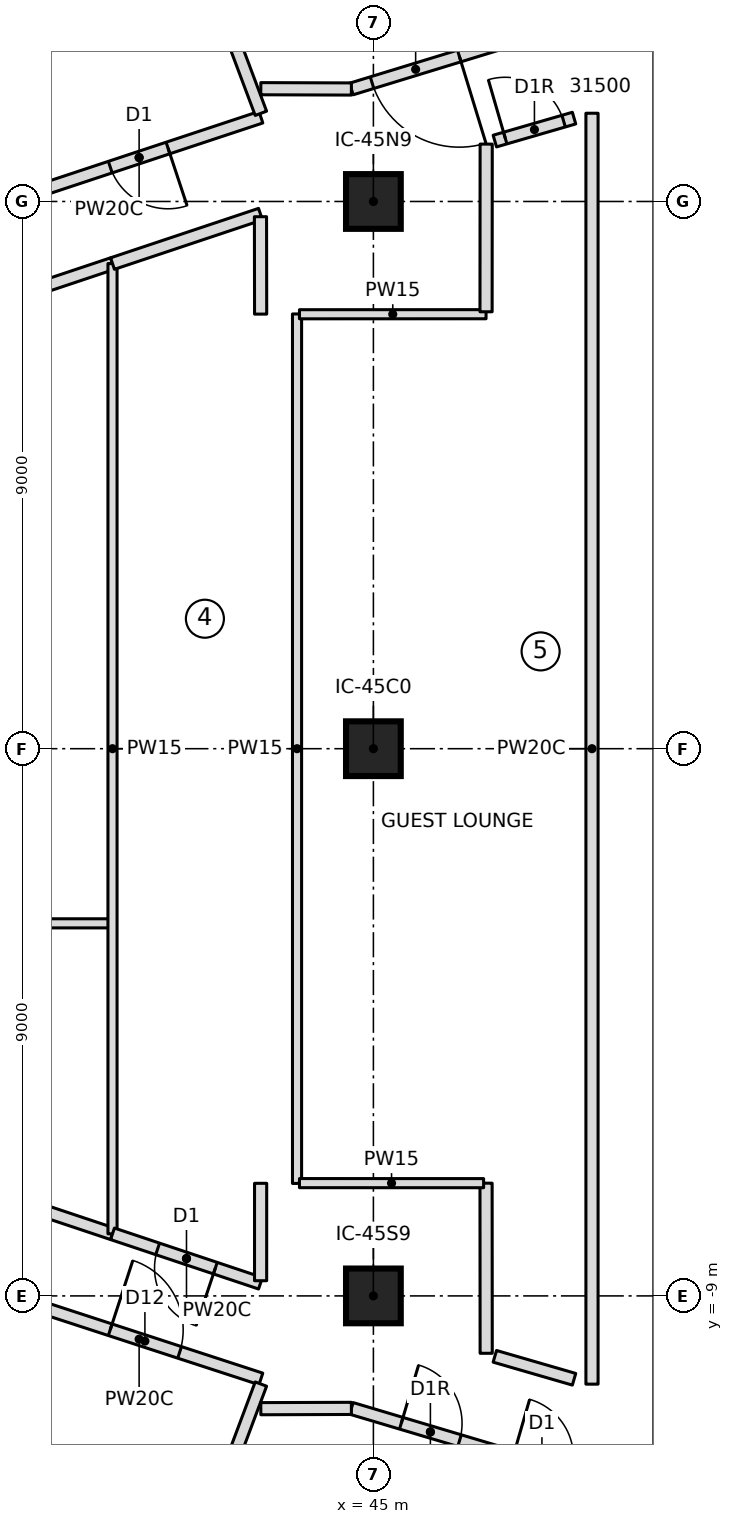
"""IFC4 building model, lengths in metres.
Left out: names, types, materials, properties, quantities, classifications, styles, units other than length and angle.
Written with IfcOpenShell. Run it as: python <this file> out.ifc"""

import sys

from ifc_helpers import new_model, si_unit, direction, frame, frame_2d, origin, origin_2d, place, context, subcontext, project, spatial, rectangle, extrude, element, fill, save


model = new_model("IFC4")
c1 = context("Model", 3, precision=1e-05, world=origin(), true_north=direction((0.0, 1.0)))
c2 = subcontext(c1, "Body", "Model", "MODEL_VIEW")
j1 = project(units=[si_unit("LENGTHUNIT", "METRE"), si_unit("PLANEANGLEUNIT", "RADIAN")], contexts=[c1])
p1 = place(None, origin())
s1 = spatial("IfcSite", under=j1, at=p1, CompositionType="ELEMENT")
p2 = place(p1, origin())
s2 = spatial("IfcBuilding", under=s1, at=p2, CompositionType="ELEMENT")
p3 = place(p2, frame((0.0, 0.0, 216.2)))
s3 = spatial("IfcBuildingStorey", under=s2, at=p3, CompositionType="ELEMENT", Elevation=216.2)
for number, where, z_axis, x_axis in (
    (1, (45.0, -9.0, 0.0), (0.0, 0.0, 1.0), (1.0, 0.0, 0.0)),
    (2, (45.0, 0.0, 0.0), (0.0, 0.0, 1.0), (1.0, 0.0, 0.0)),
    (3, (45.0, 9.0, 0.0), (0.0, 0.0, 1.0), (1.0, 0.0, 0.0)),
):
    element("IfcColumn", number, at=place(p3, frame(where, z_axis=z_axis, x_axis=x_axis)), inside=s3, PredefinedType="COLUMN", context=c2, shape_type="SweptSolid", body=[
        extrude(rectangle(XDim=0.9, YDim=0.9, at=origin_2d()), origin(), (0.0, 0.0, 1.0), 4.6),
    ])
p4 = place(p3, frame((43.15, 10.386, 0.0), z_axis=(0.0, 0.0, 1.0), x_axis=(-0.949231523576, -0.314578312427, 0.0)))
e4 = element("IfcWall", 4, at=p4, inside=s3, PredefinedType="PARTITIONING", context=c2, shape_type="SweptSolid", body=[
    extrude(rectangle(XDim=4.219, YDim=0.2, at=frame_2d((2.11, 0.0))), origin(), (0.0, 0.0, 1.0), 4.3),
])
p5 = place(p4, frame((1.61, 0.0, 0.0)))
e5 = element("IfcOpeningElement", 5, at=p5, cuts=e4, PredefinedType="OPENING", context=c2, shape_type="SweptSolid", body=[
    extrude(rectangle(XDim=1.0, YDim=2.1, at=frame_2d((0.5, 1.05))), frame((0.0, 0.11, 0.0), z_axis=(0.0, -1.0, 0.0), x_axis=(1.0, 0.0, 0.0)), (0.0, 0.0, 1.0), 0.22),
])
p6 = place(p3, frame((43.15, 10.45, 0.0), z_axis=(0.0, 0.0, 1.0), x_axis=(-0.351119888923, 0.936330509811, 0.0)))
e6 = element("IfcWall", 6, at=p6, inside=s3, PredefinedType="PARTITIONING", context=c2, shape_type="SweptSolid", body=[
    extrude(rectangle(XDim=7.531, YDim=0.2, at=frame_2d((3.766, 0.0))), origin(), (0.0, 0.0, 1.0), 4.3),
])
p7 = place(p3, frame((47.23, 11.643, 0.0), z_axis=(0.0, 0.0, 1.0), x_axis=(-0.956220019134, -0.292648722887, 0.0)))
e7 = element("IfcWall", 7, at=p7, inside=s3, PredefinedType="PARTITIONING", context=c2, shape_type="SweptSolid", body=[
    extrude(rectangle(XDim=2.71, YDim=0.2, at=frame_2d((1.355, 0.0))), origin(), (0.0, 0.0, 1.0), 4.3),
])
p8 = place(p7, frame((0.855, 0.0, 0.0)))
e8 = element("IfcOpeningElement", 8, at=p8, cuts=e7, PredefinedType="OPENING", context=c2, shape_type="SweptSolid", body=[
    extrude(rectangle(XDim=1.5, YDim=2.1, at=frame_2d((0.75, 1.05))), frame((0.0, 0.11, 0.0), z_axis=(0.0, -1.0, 0.0), x_axis=(1.0, 0.0, 0.0)), (0.0, 0.0, 1.0), 0.22),
])
p9 = place(p3, frame((39.145, -9.059, 0.0), z_axis=(0.0, 0.0, 1.0), x_axis=(0.950709044073, -0.310084365161, 0.0)))
e9 = element("IfcWall", 9, at=p9, inside=s3, PredefinedType="PARTITIONING", context=c2, shape_type="SweptSolid", body=[
    extrude(rectangle(XDim=4.213, YDim=0.2, at=frame_2d((2.106, 0.0))), origin(), (0.0, 0.0, 1.0), 4.3),
])
p10 = place(p9, frame((1.607, 0.0, 0.0)))
e10 = element("IfcOpeningElement", 10, at=p10, cuts=e9, PredefinedType="OPENING", context=c2, shape_type="SweptSolid", body=[
    extrude(rectangle(XDim=1.2, YDim=2.1, at=frame_2d((0.6, 1.05))), frame((0.0, 0.11, 0.0), z_axis=(0.0, -1.0, 0.0), x_axis=(1.0, 0.0, 0.0)), (0.0, 0.0, 1.0), 0.22),
])
p11 = place(p3, frame((40.506, -17.501, 0.0), z_axis=(0.0, 0.0, 1.0), x_axis=(0.351119888923, 0.936330509811, 0.0)))
e11 = element("IfcWall", 11, at=p11, inside=s3, PredefinedType="PARTITIONING", context=c2, shape_type="SweptSolid", body=[
    extrude(rectangle(XDim=7.531, YDim=0.2, at=frame_2d((3.766, 0.0))), origin(), (0.0, 0.0, 1.0), 4.3),
])
p12 = place(p3, frame((44.638, -10.85, 0.0), z_axis=(0.0, 0.0, 1.0), x_axis=(0.95835737874, -0.285571592801, 0.0)))
e12 = element("IfcWall", 12, at=p12, inside=s3, PredefinedType="PARTITIONING", context=c2, shape_type="SweptSolid", body=[
    extrude(rectangle(XDim=2.712, YDim=0.2, at=frame_2d((1.356, 0.0))), origin(), (0.0, 0.0, 1.0), 4.3),
])
p13 = place(p12, frame((0.856, 0.0, 0.0)))
e13 = element("IfcOpeningElement", 13, at=p13, cuts=e12, PredefinedType="OPENING", context=c2, shape_type="SweptSolid", body=[
    extrude(rectangle(XDim=1.0, YDim=2.1, at=frame_2d((0.5, 1.05))), frame((0.0, 0.11, 0.0), z_axis=(0.0, -1.0, 0.0), x_axis=(1.0, 0.0, 0.0)), (0.0, 0.0, 1.0), 0.22),
])
p14 = place(p3, frame((35.247, -2.872, 0.0), z_axis=(0.0, 0.0, 1.0), x_axis=(1.0, 0.0, 0.0)))
e14 = element("IfcWall", 14, at=p14, inside=s3, PredefinedType="PARTITIONING", context=c2, shape_type="SweptSolid", body=[
    extrude(rectangle(XDim=5.463, YDim=0.15, at=frame_2d((2.731, 0.0))), origin(), (0.0, 0.0, 1.0), 4.3),
])
for number, where, z_axis, x_axis in (
    (15, (40.709, -7.979, 0.0), (0.0, 0.0, 1.0), (-0.948, 0.317, 0.0)),
    (16, (39.314, 7.512, 0.0), (0.0, 0.0, 1.0), (0.948, 0.317, 0.0)),
):
    element("IfcWall", number, at=place(p3, frame(where, z_axis=z_axis, x_axis=x_axis)), inside=s3, PredefinedType="PARTITIONING", context=c2, shape_type="SweptSolid", body=[
        extrude(rectangle(XDim=1.472, YDim=0.2, at=frame_2d((0.736, 0.0))), origin(), (0.0, 0.0, 1.0), 4.3),
    ])
p15 = place(p3, frame((40.709, -7.979, 0.0), z_axis=(0.0, 0.0, 1.0), x_axis=(0.0, 1.0, 0.0)))
e17 = element("IfcWall", 17, at=p15, inside=s3, PredefinedType="PARTITIONING", context=c2, shape_type="SweptSolid", body=[
    extrude(rectangle(XDim=15.958, YDim=0.15, at=frame_2d((7.979, 0.0))), origin(), (0.0, 0.0, 1.0), 4.3),
])
p16 = place(p3, frame((43.143, -8.792, 0.0), z_axis=(0.0, 0.0, 1.0), x_axis=(-0.948473756095, 0.316855699016, 0.0)))
e18 = element("IfcWall", 18, at=p16, inside=s3, PredefinedType="PARTITIONING", context=c2, shape_type="SweptSolid", body=[
    extrude(rectangle(XDim=2.566, YDim=0.2, at=frame_2d((1.283, 0.0))), origin(), (0.0, 0.0, 1.0), 4.3),
])
p17 = place(p16, frame((0.783, 0.0, 0.0)))
e19 = element("IfcOpeningElement", 19, at=p17, cuts=e18, PredefinedType="OPENING", context=c2, shape_type="SweptSolid", body=[
    extrude(rectangle(XDim=1.0, YDim=2.1, at=frame_2d((0.5, 1.05))), frame((0.0, 0.11, 0.0), z_axis=(0.0, -1.0, 0.0), x_axis=(1.0, 0.0, 0.0)), (0.0, 0.0, 1.0), 0.22),
])
p18 = place(p3, frame((40.709, 7.979, 0.0), z_axis=(0.0, 0.0, 1.0), x_axis=(0.948473756095, 0.316855699016, 0.0)))
e20 = element("IfcWall", 20, at=p18, inside=s3, PredefinedType="PARTITIONING", context=c2, shape_type="SweptSolid", body=[
    extrude(rectangle(XDim=2.566, YDim=0.2, at=frame_2d((1.283, 0.0))), origin(), (0.0, 0.0, 1.0), 4.3),
])
p19 = place(p3, frame((43.744, -7.15, 0.0), z_axis=(0.0, 0.0, 1.0), x_axis=(0.0, 1.0, 0.0)))
e21 = element("IfcWall", 21, at=p19, inside=s3, PredefinedType="PARTITIONING", context=c2, shape_type="SweptSolid", body=[
    extrude(rectangle(XDim=14.3, YDim=0.15, at=frame_2d((7.15, 0.0))), origin(), (0.0, 0.0, 1.0), 4.3),
])
p20 = place(p3, frame((46.997, 9.993, 0.0), z_axis=(0.0, 0.0, 1.0), x_axis=(0.960450321583, 0.278451395706, 0.0)))
e22 = element("IfcWall", 22, at=p20, inside=s3, PredefinedType="PARTITIONING", context=c2, shape_type="SweptSolid", body=[
    extrude(rectangle(XDim=1.356, YDim=0.2, at=frame_2d((0.678, 0.0))), origin(), (0.0, 0.0, 1.0), 4.3),
])
p21 = place(p20, frame((0.178, 0.0, 0.0)))
e23 = element("IfcOpeningElement", 23, at=p21, cuts=e22, PredefinedType="OPENING", context=c2, shape_type="SweptSolid", body=[
    extrude(rectangle(XDim=1.0, YDim=2.1, at=frame_2d((0.5, 1.05))), frame((0.0, 0.11, 0.0), z_axis=(0.0, -1.0, 0.0), x_axis=(1.0, 0.0, 0.0)), (0.0, 0.0, 1.0), 0.22),
])
p22 = place(p3, frame((48.3, -10.371, 0.0), z_axis=(0.0, 0.0, 1.0), x_axis=(-0.960450321583, 0.278451395706, 0.0)))
e24 = element("IfcWall", 24, at=p22, inside=s3, PredefinedType="PARTITIONING", context=c2, shape_type="SweptSolid", body=[
    extrude(rectangle(XDim=1.356, YDim=0.2, at=frame_2d((0.678, 0.0))), origin(), (0.0, 0.0, 1.0), 4.3),
])
p23 = place(p3, frame((43.143, 8.75, 0.0), z_axis=(0.0, 0.0, 1.0), x_axis=(0.001524156132, -0.999998838473, 0.0)))
e25 = element("IfcWall", 25, at=p23, inside=s3, PredefinedType="PARTITIONING", context=c2, shape_type="SweptSolid", body=[
    extrude(rectangle(XDim=1.602, YDim=0.2, at=frame_2d((0.801, 0.0))), origin(), (0.0, 0.0, 1.0), 4.3),
])
p24 = place(p3, frame((43.146, -7.148, 0.0), z_axis=(0.0, 0.0, 1.0), x_axis=(-0.000304785112, -0.999999953553, 0.0)))
e26 = element("IfcWall", 26, at=p24, inside=s3, PredefinedType="PARTITIONING", context=c2, shape_type="SweptSolid", body=[
    extrude(rectangle(XDim=1.602, YDim=0.2, at=frame_2d((0.801, 0.0))), origin(), (0.0, 0.0, 1.0), 4.3),
])
p25 = place(p3, frame((43.784, 7.145, 0.0), z_axis=(0.0, 0.0, 1.0), x_axis=(0.999999971515, 0.000238682466, 0.0)))
e27 = element("IfcWall", 27, at=p25, inside=s3, PredefinedType="PARTITIONING", context=c2, shape_type="SweptSolid", body=[
    extrude(rectangle(XDim=3.069, YDim=0.15, at=frame_2d((1.534, 0.0))), origin(), (0.0, 0.0, 1.0), 4.3),
])
p26 = place(p3, frame((46.853, 7.186, 0.0), z_axis=(0.0, 0.0, 1.0), x_axis=(0.00079667143, 0.999999682657, 0.0)))
e28 = element("IfcWall", 28, at=p26, inside=s3, PredefinedType="PARTITIONING", context=c2, shape_type="SweptSolid", body=[
    extrude(rectangle(XDim=2.758, YDim=0.2, at=frame_2d((1.379, 0.0))), origin(), (0.0, 0.0, 1.0), 4.3),
])
p27 = place(p3, frame((48.595, 10.451, 0.0), z_axis=(0.0, 0.0, 1.0), x_axis=(0.0, -1.0, 0.0)))
e29 = element("IfcWall", 29, at=p27, inside=s3, PredefinedType="PARTITIONING", context=c2, shape_type="SweptSolid", body=[
    extrude(rectangle(XDim=20.903, YDim=0.2, at=frame_2d((10.451, 0.0))), origin(), (0.0, 0.0, 1.0), 4.3),
])
p28 = place(p3, frame((46.855, -9.944, 0.0), z_axis=(0.0, 0.0, 1.0), x_axis=(-0.000785271549, 0.999999691674, 0.0)))
e30 = element("IfcWall", 30, at=p28, inside=s3, PredefinedType="PARTITIONING", context=c2, shape_type="SweptSolid", body=[
    extrude(rectangle(XDim=2.798, YDim=0.2, at=frame_2d((1.399, 0.0))), origin(), (0.0, 0.0, 1.0), 4.3),
])
p29 = place(p3, frame((46.813, -7.146, 0.0), z_axis=(0.0, 0.0, 1.0), x_axis=(-0.999999970757, 0.000241837961, 0.0)))
e31 = element("IfcWall", 31, at=p29, inside=s3, PredefinedType="PARTITIONING", context=c2, shape_type="SweptSolid", body=[
    extrude(rectangle(XDim=3.029, YDim=0.15, at=frame_2d((1.514, 0.0))), origin(), (0.0, 0.0, 1.0), 4.3),
])
for number, where, z_axis, x_axis in (
    (32, (44.638, 10.85, 0.0), (0.0, 0.0, 1.0), (-1.0, 0.003, 0.0)),
    (33, (43.148, -10.855, 0.0), (0.0, 0.0, 1.0), (1.0, 0.003, 0.0)),
):
    element("IfcWall", number, at=place(p3, frame(where, z_axis=z_axis, x_axis=x_axis)), inside=s3, PredefinedType="PARTITIONING", context=c2, shape_type="SweptSolid", body=[
        extrude(rectangle(XDim=1.49, YDim=0.2, at=frame_2d((0.745, 0.0))), origin(), (0.0, 0.0, 1.0), 4.3),
    ])
p30 = place(p5, origin())
e34 = element("IfcDoor", 34, at=p30, inside=s3, OperationType="SINGLE_SWING_LEFT", PredefinedType="DOOR", context=c2, shape_type="SweptSolid", body=[
    extrude(rectangle(XDim=1.0, YDim=2.1, at=frame_2d((0.5, 1.05))), frame((0.0, 0.025, 0.0), z_axis=(0.0, -1.0, 0.0), x_axis=(1.0, 0.0, 0.0)), (0.0, 0.0, 1.0), 0.05),
])
fill(e5, e34)
p31 = place(p8, origin())
e35 = element("IfcDoor", 35, at=p31, inside=s3, OperationType="DOUBLE_DOOR_SINGLE_SWING", PredefinedType="DOOR", context=c2, shape_type="SweptSolid", body=[
    extrude(rectangle(XDim=1.5, YDim=2.1, at=frame_2d((0.75, 1.05))), frame((0.0, 0.025, 0.0), z_axis=(0.0, -1.0, 0.0), x_axis=(1.0, 0.0, 0.0)), (0.0, 0.0, 1.0), 0.05),
])
fill(e8, e35)
p32 = place(p10, origin())
e36 = element("IfcDoor", 36, at=p32, inside=s3, OperationType="SINGLE_SWING_RIGHT", PredefinedType="DOOR", context=c2, shape_type="SweptSolid", body=[
    extrude(rectangle(XDim=1.2, YDim=2.1, at=frame_2d((0.6, 1.05))), frame((0.0, 0.025, 0.0), z_axis=(0.0, -1.0, 0.0), x_axis=(1.0, 0.0, 0.0)), (0.0, 0.0, 1.0), 0.05),
])
fill(e10, e36)
p33 = place(p13, origin())
e37 = element("IfcDoor", 37, at=p33, inside=s3, OperationType="SINGLE_SWING_RIGHT", PredefinedType="DOOR", context=c2, shape_type="SweptSolid", body=[
    extrude(rectangle(XDim=1.0, YDim=2.1, at=frame_2d((0.5, 1.05))), frame((0.0, 0.025, 0.0), z_axis=(0.0, -1.0, 0.0), x_axis=(1.0, 0.0, 0.0)), (0.0, 0.0, 1.0), 0.05),
])
fill(e13, e37)
p34 = place(p17, origin())
e38 = element("IfcDoor", 38, at=p34, inside=s3, OperationType="SINGLE_SWING_LEFT", PredefinedType="DOOR", context=c2, shape_type="SweptSolid", body=[
    extrude(rectangle(XDim=1.0, YDim=2.1, at=frame_2d((0.5, 1.05))), frame((0.0, 0.025, 0.0), z_axis=(0.0, -1.0, 0.0), x_axis=(1.0, 0.0, 0.0)), (0.0, 0.0, 1.0), 0.05),
])
fill(e19, e38)
p35 = place(p21, origin())
e39 = element("IfcDoor", 39, at=p35, inside=s3, OperationType="SINGLE_SWING_RIGHT", PredefinedType="DOOR", context=c2, shape_type="SweptSolid", body=[
    extrude(rectangle(XDim=1.0, YDim=2.1, at=frame_2d((0.5, 1.05))), frame((0.0, 0.025, 0.0), z_axis=(0.0, -1.0, 0.0), x_axis=(1.0, 0.0, 0.0)), (0.0, 0.0, 1.0), 0.05),
])
fill(e23, e39)
save(model, sys.argv[1])
